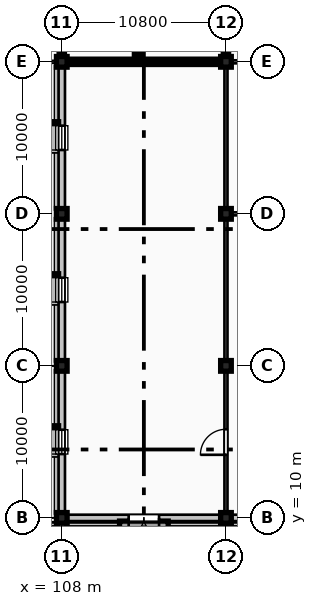
"""IFC4 building model, lengths in metres.
Left out: names, types, materials, properties, quantities, classifications, styles, units other than length and angle.
Written with IfcOpenShell. Run it as: python <this file> out.ifc"""

import sys

from ifc_helpers import new_model, si_unit, direction, frame, frame_2d, origin, origin_2d, place, context, subcontext, project, spatial, rectangle, extrude, element, fill, save


model = new_model("IFC4")
c1 = context("Model", 3, precision=1e-05, world=origin(), true_north=direction((0.0, 1.0)))
c2 = subcontext(c1, "Body", "Model", "MODEL_VIEW")
j1 = project(units=[si_unit("LENGTHUNIT", "METRE"), si_unit("PLANEANGLEUNIT", "RADIAN")], contexts=[c1])
p1 = place(None, origin())
s1 = spatial("IfcSite", under=j1, at=p1, CompositionType="ELEMENT")
p2 = place(p1, origin())
s2 = spatial("IfcBuilding", under=s1, at=p2, CompositionType="ELEMENT")
p3 = place(p2, origin())
s3 = spatial("IfcBuildingStorey", under=s2, at=p3, CompositionType="ELEMENT", Elevation=0.0)
for number, where, z_axis, x_axis in (
    (1, (108.0, 10.0, 0.0), (0.0, 0.0, 1.0), (1.0, 0.0, 0.0)),
    (2, (108.0, 20.0, 0.0), (0.0, 0.0, 1.0), (1.0, 0.0, 0.0)),
    (3, (108.0, 30.0, 0.0), (0.0, 0.0, 1.0), (1.0, 0.0, 0.0)),
    (4, (108.0, 40.0, 0.0), (0.0, 0.0, 1.0), (1.0, 0.0, 0.0)),
    (5, (118.8, 10.0, 0.0), (0.0, 0.0, 1.0), (1.0, 0.0, 0.0)),
    (6, (118.8, 20.0, 0.0), (0.0, 0.0, 1.0), (1.0, 0.0, 0.0)),
    (7, (118.8, 30.0, 0.0), (0.0, 0.0, 1.0), (1.0, 0.0, 0.0)),
    (8, (118.8, 40.0, 0.0), (0.0, 0.0, 1.0), (1.0, 0.0, 0.0)),
):
    element("IfcColumn", number, at=place(p3, frame(where, z_axis=z_axis, x_axis=x_axis)), inside=s3, PredefinedType="COLUMN", context=c2, shape_type="SweptSolid", body=[
        extrude(rectangle(XDim=0.7, YDim=0.7, at=origin_2d()), origin(), (0.0, 0.0, 1.0), 4.8),
    ])
for number, where, z_axis, x_axis in (
    (9, (54.2, 9.57, -1.38), (0.0, 0.0, 1.0), (1.0, 0.0, 0.0)),
    (10, (108.2, 9.57, -1.38), (0.0, 0.0, 1.0), (1.0, 0.0, 0.0)),
):
    element("IfcWall", number, at=place(p3, frame(where, z_axis=z_axis, x_axis=x_axis)), inside=s3, PredefinedType="PARAPET", context=c2, shape_type="SweptSolid", body=[
        extrude(rectangle(XDim=53.6, YDim=0.26, at=frame_2d((26.8, 0.0))), origin(), (0.0, 0.0, 1.0), 1.36),
    ])
p4 = place(p3, frame((107.63, 40.0, 0.0), z_axis=(0.0, 0.0, 1.0), x_axis=(1.0, 0.0, 0.0)))
e11 = element("IfcWall", 11, at=p4, inside=s3, PredefinedType="STANDARD", context=c2, shape_type="SweptSolid", body=[
    extrude(rectangle(XDim=0.225, YDim=0.3, at=frame_2d((0.113, 0.0))), origin(), (0.0, 0.0, 1.0), 4.56),
])
p5 = place(p3, frame((108.0, 39.855, 0.0), z_axis=(0.0, 0.0, 1.0), x_axis=(0.0, -1.0, 0.0)))
e12 = element("IfcWall", 12, at=p5, inside=s3, PredefinedType="STANDARD", context=c2, shape_type="SweptSolid", body=[
    extrude(rectangle(XDim=9.71, YDim=0.42, at=frame_2d((4.855, 0.0))), origin(), (0.0, 0.0, 1.0), 3.97),
])
p6 = place(p5, frame((4.055, 0.0, 1.2)))
e13 = element("IfcOpeningElement", 13, at=p6, cuts=e12, PredefinedType="OPENING", context=c2, shape_type="SweptSolid", body=[
    extrude(rectangle(XDim=1.6, YDim=1.8, at=frame_2d((0.8, 0.9))), frame((0.0, 0.22, 0.0), z_axis=(0.0, -1.0, 0.0), x_axis=(1.0, 0.0, 0.0)), (0.0, 0.0, 1.0), 0.44),
])
p7 = place(p3, frame((108.0, 29.855, 0.0), z_axis=(0.0, 0.0, 1.0), x_axis=(0.0, -1.0, 0.0)))
e14 = element("IfcWall", 14, at=p7, inside=s3, PredefinedType="STANDARD", context=c2, shape_type="SweptSolid", body=[
    extrude(rectangle(XDim=9.71, YDim=0.42, at=frame_2d((4.855, 0.0))), origin(), (0.0, 0.0, 1.0), 3.97),
])
p8 = place(p7, frame((4.055, 0.0, 1.2)))
e15 = element("IfcOpeningElement", 15, at=p8, cuts=e14, PredefinedType="OPENING", context=c2, shape_type="SweptSolid", body=[
    extrude(rectangle(XDim=1.6, YDim=1.8, at=frame_2d((0.8, 0.9))), frame((0.0, 0.22, 0.0), z_axis=(0.0, -1.0, 0.0), x_axis=(1.0, 0.0, 0.0)), (0.0, 0.0, 1.0), 0.44),
])
p9 = place(p3, frame((108.0, 19.855, 0.0), z_axis=(0.0, 0.0, 1.0), x_axis=(0.0, -1.0, 0.0)))
e16 = element("IfcWall", 16, at=p9, inside=s3, PredefinedType="STANDARD", context=c2, shape_type="SweptSolid", body=[
    extrude(rectangle(XDim=9.71, YDim=0.42, at=frame_2d((4.855, 0.0))), origin(), (0.0, 0.0, 1.0), 3.97),
])
p10 = place(p9, frame((4.055, 0.0, 1.2)))
e17 = element("IfcOpeningElement", 17, at=p10, cuts=e16, PredefinedType="OPENING", context=c2, shape_type="SweptSolid", body=[
    extrude(rectangle(XDim=1.6, YDim=1.8, at=frame_2d((0.8, 0.9))), frame((0.0, 0.22, 0.0), z_axis=(0.0, -1.0, 0.0), x_axis=(1.0, 0.0, 0.0)), (0.0, 0.0, 1.0), 0.44),
])
p11 = place(p3, frame((108.145, 10.0, 0.0), z_axis=(0.0, 0.0, 1.0), x_axis=(1.0, 0.0, 0.0)))
e18 = element("IfcWall", 18, at=p11, inside=s3, PredefinedType="STANDARD", context=c2, shape_type="SweptSolid", body=[
    extrude(rectangle(XDim=10.51, YDim=0.42, at=frame_2d((5.255, 0.0))), origin(), (0.0, 0.0, 1.0), 3.819),
])
p12 = place(p11, frame((4.255, 0.0, 0.0)))
e19 = element("IfcOpeningElement", 19, at=p12, cuts=e18, PredefinedType="OPENING", context=c2, shape_type="SweptSolid", body=[
    extrude(rectangle(XDim=2.0, YDim=2.3, at=frame_2d((1.0, 1.15))), frame((0.0, 0.22, 0.0), z_axis=(0.0, -1.0, 0.0), x_axis=(1.0, 0.0, 0.0)), (0.0, 0.0, 1.0), 0.44),
])
p13 = place(p3, frame((118.945, 10.0, 0.0), z_axis=(0.0, 0.0, 1.0), x_axis=(1.0, 0.0, 0.0)))
e20 = element("IfcWall", 20, at=p13, inside=s3, PredefinedType="STANDARD", context=c2, shape_type="SweptSolid", body=[
    extrude(rectangle(XDim=10.51, YDim=0.42, at=frame_2d((5.255, 0.0))), origin(), (0.0, 0.0, 1.0), 3.819),
])
p14 = place(p13, frame((4.255, 0.0, 0.0)))
e21 = element("IfcOpeningElement", 21, at=p14, cuts=e20, PredefinedType="OPENING", context=c2, shape_type="SweptSolid", body=[
    extrude(rectangle(XDim=2.0, YDim=2.3, at=frame_2d((1.0, 1.15))), frame((0.0, 0.22, 0.0), z_axis=(0.0, -1.0, 0.0), x_axis=(1.0, 0.0, 0.0)), (0.0, 0.0, 1.0), 0.44),
])
p15 = place(p3, frame((108.35, 40.0, 0.0), z_axis=(0.0, 0.0, 1.0), x_axis=(1.0, 0.0, 0.0)))
e22 = element("IfcWall", 22, at=p15, inside=s3, PredefinedType="SHEAR", context=c2, shape_type="SweptSolid", body=[
    extrude(rectangle(XDim=10.1, YDim=0.35, at=frame_2d((5.05, 0.0))), origin(), (0.0, 0.0, 1.0), 4.56),
])
p16 = place(p3, frame((108.0, 40.35, 0.0), z_axis=(0.0, 0.0, 1.0), x_axis=(0.0, 1.0, 0.0)))
e23 = element("IfcWall", 23, at=p16, inside=s3, PredefinedType="SHEAR", context=c2, shape_type="SweptSolid", body=[
    extrude(rectangle(XDim=9.3, YDim=0.35, at=frame_2d((4.65, 0.0))), origin(), (0.0, 0.0, 1.0), 4.56),
])
p17 = place(p3, frame((118.8, 40.35, 0.0), z_axis=(0.0, 0.0, 1.0), x_axis=(0.0, 1.0, 0.0)))
e24 = element("IfcWall", 24, at=p17, inside=s3, PredefinedType="SHEAR", context=c2, shape_type="SweptSolid", body=[
    extrude(rectangle(XDim=9.3, YDim=0.35, at=frame_2d((4.65, 0.0))), origin(), (0.0, 0.0, 1.0), 4.56),
])
p18 = place(p17, frame((0.83, 0.0, 0.0)))
e25 = element("IfcOpeningElement", 25, at=p18, cuts=e24, PredefinedType="OPENING", context=c2, shape_type="SweptSolid", body=[
    extrude(rectangle(XDim=1.8, YDim=2.25, at=frame_2d((0.9, 1.125))), frame((0.0, 0.185, 0.0), z_axis=(0.0, -1.0, 0.0), x_axis=(1.0, 0.0, 0.0)), (0.0, 0.0, 1.0), 0.37),
])
p19 = place(p3, frame((112.95, 40.175, 0.0), z_axis=(0.0, 0.0, 1.0), x_axis=(0.0, 1.0, 0.0)))
e26 = element("IfcWall", 26, at=p19, inside=s3, PredefinedType="SHEAR", context=c2, shape_type="SweptSolid", body=[
    extrude(rectangle(XDim=9.65, YDim=0.35, at=frame_2d((4.825, 0.0))), origin(), (0.0, 0.0, 1.0), 4.56),
])
p20 = place(p19, frame((0.9, 0.0, 0.0)))
e27 = element("IfcOpeningElement", 27, at=p20, cuts=e26, PredefinedType="OPENING", context=c2, shape_type="SweptSolid", body=[
    extrude(rectangle(XDim=1.1, YDim=2.2, at=frame_2d((0.55, 1.1))), frame((0.0, 0.185, 0.0), z_axis=(0.0, -1.0, 0.0), x_axis=(1.0, 0.0, 0.0)), (0.0, 0.0, 1.0), 0.37),
])
p21 = place(p3, frame((118.98, 30.0, 0.0), z_axis=(0.0, 0.0, 1.0), x_axis=(1.0, 0.0, 0.0)))
e28 = element("IfcWall", 28, at=p21, inside=s3, PredefinedType="SOLIDWALL", context=c2, shape_type="SweptSolid", body=[
    extrude(rectangle(XDim=10.42, YDim=0.2, at=frame_2d((5.21, 0.0))), origin(), (0.0, 0.0, 1.0), 3.819),
])
p22 = place(p21, frame((3.81, 0.0, 0.0)))
e29 = element("IfcOpeningElement", 29, at=p22, cuts=e28, PredefinedType="OPENING", context=c2, shape_type="SweptSolid", body=[
    extrude(rectangle(XDim=2.8, YDim=2.9, at=frame_2d((1.4, 1.45))), frame((0.0, 0.11, 0.0), z_axis=(0.0, -1.0, 0.0), x_axis=(1.0, 0.0, 0.0)), (0.0, 0.0, 1.0), 0.22),
])
p23 = place(p3, frame((118.98, 40.0, 0.0), z_axis=(0.0, 0.0, 1.0), x_axis=(1.0, 0.0, 0.0)))
e30 = element("IfcWall", 30, at=p23, inside=s3, PredefinedType="SOLIDWALL", context=c2, shape_type="SweptSolid", body=[
    extrude(rectangle(XDim=10.42, YDim=0.2, at=frame_2d((5.21, 0.0))), origin(), (0.0, 0.0, 1.0), 3.819),
])
p24 = place(p23, frame((4.41, 0.0, 0.0)))
e31 = element("IfcOpeningElement", 31, at=p24, cuts=e30, PredefinedType="OPENING", context=c2, shape_type="SweptSolid", body=[
    extrude(rectangle(XDim=1.6, YDim=2.3, at=frame_2d((0.8, 1.15))), frame((0.0, 0.11, 0.0), z_axis=(0.0, -1.0, 0.0), x_axis=(1.0, 0.0, 0.0)), (0.0, 0.0, 1.0), 0.22),
])
p25 = place(p3, frame((118.8, 10.18, 0.0), z_axis=(0.0, 0.0, 1.0), x_axis=(0.0, 1.0, 0.0)))
e32 = element("IfcWall", 32, at=p25, inside=s3, PredefinedType="SOLIDWALL", context=c2, shape_type="SweptSolid", body=[
    extrude(rectangle(XDim=9.62, YDim=0.2, at=frame_2d((4.81, 0.0))), origin(), (0.0, 0.0, 1.0), 3.97),
])
p26 = place(p25, frame((3.97, 0.0, 0.0)))
e33 = element("IfcOpeningElement", 33, at=p26, cuts=e32, PredefinedType="OPENING", context=c2, shape_type="SweptSolid", body=[
    extrude(rectangle(XDim=1.68, YDim=2.52, at=frame_2d((0.84, 1.26))), frame((0.0, 0.11, 0.0), z_axis=(0.0, -1.0, 0.0), x_axis=(1.0, 0.0, 0.0)), (0.0, 0.0, 1.0), 0.22),
])
p27 = place(p3, frame((118.8, 20.2, 0.0), z_axis=(0.0, 0.0, 1.0), x_axis=(0.0, 1.0, 0.0)))
e34 = element("IfcWall", 34, at=p27, inside=s3, PredefinedType="SOLIDWALL", context=c2, shape_type="SweptSolid", body=[
    extrude(rectangle(XDim=9.6, YDim=0.2, at=frame_2d((4.8, 0.0))), origin(), (0.0, 0.0, 1.0), 3.97),
])
p28 = place(p3, frame((118.8, 30.2, 0.0), z_axis=(0.0, 0.0, 1.0), x_axis=(0.0, 1.0, 0.0)))
e35 = element("IfcWall", 35, at=p28, inside=s3, PredefinedType="SOLIDWALL", context=c2, shape_type="SweptSolid", body=[
    extrude(rectangle(XDim=9.62, YDim=0.2, at=frame_2d((4.81, 0.0))), origin(), (0.0, 0.0, 1.0), 3.97),
])
p29 = place(p6, origin())
e36 = element("IfcWindow", 36, at=p29, inside=s3, PartitioningType="SINGLE_PANEL", PredefinedType="WINDOW", context=c2, shape_type="SweptSolid", body=[
    extrude(rectangle(XDim=1.6, YDim=1.8, at=frame_2d((0.8, 0.9))), frame((0.0, 0.03, 0.0), z_axis=(0.0, -1.0, 0.0), x_axis=(1.0, 0.0, 0.0)), (0.0, 0.0, 1.0), 0.06),
])
fill(e13, e36)
p30 = place(p8, origin())
e37 = element("IfcWindow", 37, at=p30, inside=s3, PartitioningType="SINGLE_PANEL", PredefinedType="WINDOW", context=c2, shape_type="SweptSolid", body=[
    extrude(rectangle(XDim=1.6, YDim=1.8, at=frame_2d((0.8, 0.9))), frame((0.0, 0.03, 0.0), z_axis=(0.0, -1.0, 0.0), x_axis=(1.0, 0.0, 0.0)), (0.0, 0.0, 1.0), 0.06),
])
fill(e15, e37)
p31 = place(p10, origin())
e38 = element("IfcWindow", 38, at=p31, inside=s3, PartitioningType="SINGLE_PANEL", PredefinedType="WINDOW", context=c2, shape_type="SweptSolid", body=[
    extrude(rectangle(XDim=1.6, YDim=1.8, at=frame_2d((0.8, 0.9))), frame((0.0, 0.03, 0.0), z_axis=(0.0, -1.0, 0.0), x_axis=(1.0, 0.0, 0.0)), (0.0, 0.0, 1.0), 0.06),
])
fill(e17, e38)
p32 = place(p12, frame((2.0, 0.0, 0.0), z_axis=(0.0, 0.0, 1.0), x_axis=(-1.0, 0.0, 0.0)))
e39 = element("IfcDoor", 39, at=p32, inside=s3, OperationType="DOUBLE_DOOR_SINGLE_SWING", PredefinedType="DOOR", context=c2, shape_type="SweptSolid", body=[
    extrude(rectangle(XDim=2.0, YDim=2.3, at=frame_2d((1.0, 1.15))), frame((0.0, 0.025, 0.0), z_axis=(0.0, -1.0, 0.0), x_axis=(1.0, 0.0, 0.0)), (0.0, 0.0, 1.0), 0.05),
])
fill(e19, e39)
p33 = place(p26, origin())
e40 = element("IfcDoor", 40, at=p33, inside=s3, OperationType="SINGLE_SWING_LEFT", PredefinedType="DOOR", context=c2, shape_type="SweptSolid", body=[
    extrude(rectangle(XDim=1.68, YDim=2.52, at=frame_2d((0.84, 1.26))), frame((0.0, 0.025, 0.0), z_axis=(0.0, -1.0, 0.0), x_axis=(1.0, 0.0, 0.0)), (0.0, 0.0, 1.0), 0.05),
])
fill(e33, e40)
save(model, sys.argv[1])
